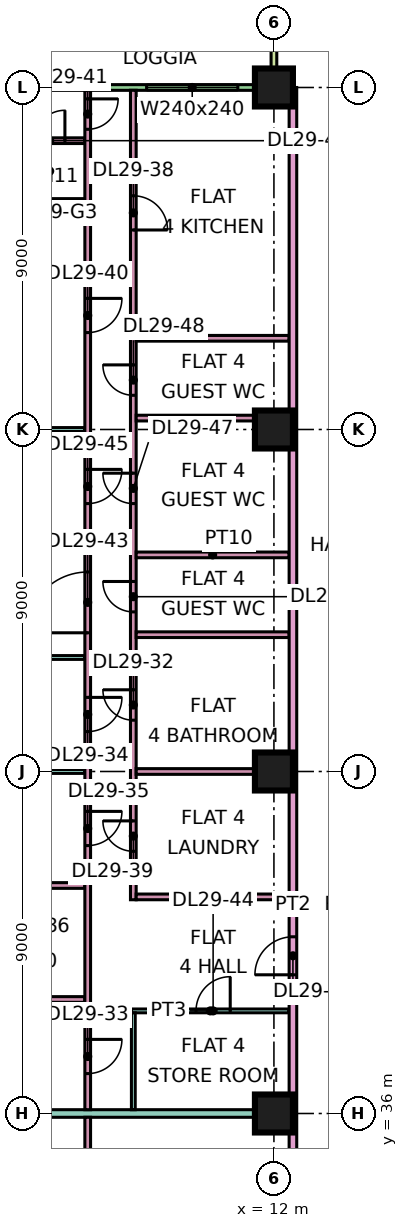
"""IFC4 building model, lengths in metres.
Left out: names, types, materials, properties, quantities, classifications, styles, units other than length and angle.
Written with IfcOpenShell. Run it as: python <this file> out.ifc"""

import sys

from ifc_helpers import new_model, si_unit, direction, frame, frame_2d, origin, origin_2d, place, context, subcontext, project, spatial, rectangle, extrude, element, fill, save


model = new_model("IFC4")
c1 = context("Model", 3, precision=1e-05, world=origin(), true_north=direction((0.0, 1.0)))
c2 = subcontext(c1, "Body", "Model", "MODEL_VIEW")
j1 = project(units=[si_unit("LENGTHUNIT", "METRE"), si_unit("PLANEANGLEUNIT", "RADIAN")], contexts=[c1])
p1 = place(None, origin())
s1 = spatial("IfcSite", under=j1, at=p1, CompositionType="ELEMENT")
p2 = place(p1, origin())
s2 = spatial("IfcBuilding", under=s1, at=p2, CompositionType="ELEMENT")
p3 = place(p2, frame((0.0, 0.0, 125.65)))
s3 = spatial("IfcBuildingStorey", under=s2, at=p3, CompositionType="ELEMENT", Elevation=125.65)
for number, where, z_axis, x_axis in (
    (1, (12.0, 36.0, 0.0), (0.0, 0.0, 1.0), (1.0, 0.0, 0.0)),
    (2, (12.0, 45.0, 0.0), (0.0, 0.0, 1.0), (1.0, 0.0, 0.0)),
    (3, (12.0, 54.0, 0.0), (0.0, 0.0, 1.0), (1.0, 0.0, 0.0)),
    (4, (12.0, 63.0, 0.0), (0.0, 0.0, 1.0), (1.0, 0.0, 0.0)),
):
    element("IfcColumn", number, at=place(p3, frame(where, z_axis=z_axis, x_axis=x_axis)), inside=s3, PredefinedType="COLUMN", context=c2, shape_type="SweptSolid", body=[
        extrude(rectangle(XDim=1.0, YDim=1.0, at=origin_2d()), origin(), (0.0, 0.0, 1.0), 3.75),
    ])
p4 = place(p3, frame((11.925, 63.0, 0.0), z_axis=(0.0, 0.0, 1.0), x_axis=(-1.0, 0.0, 0.0)))
e5 = element("IfcWall", 5, at=p4, inside=s3, PredefinedType="SOLIDWALL", context=c2, shape_type="SweptSolid", body=[
    extrude(rectangle(XDim=10.35, YDim=0.15, at=frame_2d((5.175, 0.0))), origin(), (0.0, 0.0, 1.0), 3.35),
])
p5 = place(p4, frame((0.875, 0.0, 0.45)))
e6 = element("IfcOpeningElement", 6, at=p5, cuts=e5, PredefinedType="OPENING", context=c2, shape_type="SweptSolid", body=[
    extrude(rectangle(XDim=2.4, YDim=2.4, at=frame_2d((1.2, 1.2))), frame((0.0, 0.085, 0.0), z_axis=(0.0, -1.0, 0.0), x_axis=(1.0, 0.0, 0.0)), (0.0, 0.0, 1.0), 0.17),
])
p6 = place(p4, frame((6.688, 0.0, 0.0)))
e7 = element("IfcOpeningElement", 7, at=p6, cuts=e5, PredefinedType="OPENING", context=c2, shape_type="SweptSolid", body=[
    extrude(rectangle(XDim=1.8, YDim=2.4, at=frame_2d((0.9, 1.2))), frame((0.0, 0.085, 0.0), z_axis=(0.0, -1.0, 0.0), x_axis=(1.0, 0.0, 0.0)), (0.0, 0.0, 1.0), 0.17),
])
p7 = place(p3, frame((12.0, 64.5, 0.0), z_axis=(0.0, 0.0, 1.0), x_axis=(0.0, -1.0, 0.0)))
e8 = element("IfcWall", 8, at=p7, inside=s3, PredefinedType="SOLIDWALL", context=c2, shape_type="SweptSolid", body=[
    extrude(rectangle(XDim=1.5, YDim=0.15, at=frame_2d((0.75, 0.0))), origin(), (0.0, 0.0, 1.0), 3.35),
])
p8 = place(p3, frame((-1.351, 39.0, 0.0), z_axis=(0.0, 0.0, 1.0), x_axis=(1.0, 0.0, 0.0)))
e9 = element("IfcWall", 9, at=p8, inside=s3, PredefinedType="PARTITIONING", context=c2, shape_type="SweptSolid", body=[
    extrude(rectangle(XDim=8.376, YDim=0.15, at=frame_2d((4.188, 0.0))), origin(), (0.0, 0.0, 1.0), 3.35),
])
p9 = place(p3, frame((-1.351, 45.0, 0.0), z_axis=(0.0, 0.0, 1.0), x_axis=(1.0, 0.0, 0.0)))
e10 = element("IfcWall", 10, at=p9, inside=s3, PredefinedType="PARTITIONING", context=c2, shape_type="SweptSolid", body=[
    extrude(rectangle(XDim=8.376, YDim=0.1, at=frame_2d((4.188, 0.0))), origin(), (0.0, 0.0, 1.0), 3.35),
])
p10 = place(p3, frame((0.0, 36.0, 0.0), z_axis=(0.0, 0.0, 1.0), x_axis=(1.0, 0.0, 0.0)))
e11 = element("IfcWall", 11, at=p10, inside=s3, PredefinedType="PARTITIONING", context=c2, shape_type="SweptSolid", body=[
    extrude(rectangle(XDim=12.4, YDim=0.2, at=frame_2d((6.2, 0.0))), origin(), (0.0, 0.0, 1.0), 3.35),
])
p11 = place(p3, frame((0.0, 48.0, 0.0), z_axis=(0.0, 0.0, 1.0), x_axis=(1.0, 0.0, 0.0)))
e12 = element("IfcWall", 12, at=p11, inside=s3, PredefinedType="PARTITIONING", context=c2, shape_type="SweptSolid", body=[
    extrude(rectangle(XDim=7.025, YDim=0.1, at=frame_2d((3.512, 0.0))), origin(), (0.0, 0.0, 1.0), 3.35),
])
for number, where, z_axis, x_axis in (
    (13, (0.074, 51.0, 0.0), (0.0, 0.0, 1.0), (1.0, 0.0, 0.0)),
    (14, (0.074, 54.0, 0.0), (0.0, 0.0, 1.0), (1.0, 0.0, 0.0)),
):
    element("IfcWall", number, at=place(p3, frame(where, z_axis=z_axis, x_axis=x_axis)), inside=s3, PredefinedType="PARTITIONING", context=c2, shape_type="SweptSolid", body=[
        extrude(rectangle(XDim=6.951, YDim=0.1, at=frame_2d((3.476, 0.0))), origin(), (0.0, 0.0, 1.0), 3.35),
    ])
p12 = place(p3, frame((0.074, 60.0, 0.0), z_axis=(0.0, 0.0, 1.0), x_axis=(1.0, 0.0, 0.0)))
e15 = element("IfcWall", 15, at=p12, inside=s3, PredefinedType="PARTITIONING", context=c2, shape_type="SweptSolid", body=[
    extrude(rectangle(XDim=6.951, YDim=0.15, at=frame_2d((3.476, 0.0))), origin(), (0.0, 0.0, 1.0), 3.35),
])
p13 = place(p3, frame((4.175, 42.0, 0.0), z_axis=(0.0, 0.0, 1.0), x_axis=(1.0, 0.0, 0.0)))
e16 = element("IfcWall", 16, at=p13, inside=s3, PredefinedType="PARTITIONING", context=c2, shape_type="SweptSolid", body=[
    extrude(rectangle(XDim=2.85, YDim=0.15, at=frame_2d((1.425, 0.0))), origin(), (0.0, 0.0, 1.0), 3.35),
])
p14 = place(p13, frame((0.975, 0.0, 0.0)))
e17 = element("IfcOpeningElement", 17, at=p14, cuts=e16, PredefinedType="OPENING", context=c2, shape_type="SweptSolid", body=[
    extrude(rectangle(XDim=0.8, YDim=2.1, at=frame_2d((0.4, 1.05))), frame((0.0, 0.085, 0.0), z_axis=(0.0, -1.0, 0.0), x_axis=(1.0, 0.0, 0.0)), (0.0, 0.0, 1.0), 0.17),
])
p15 = place(p3, frame((5.025, 61.6, 0.0), z_axis=(0.0, 0.0, 1.0), x_axis=(1.0, 0.0, 0.0)))
e18 = element("IfcWall", 18, at=p15, inside=s3, PredefinedType="PARTITIONING", context=c2, shape_type="SweptSolid", body=[
    extrude(rectangle(XDim=2.0, YDim=0.15, at=frame_2d((1.0, 0.0))), origin(), (0.0, 0.0, 1.0), 3.35),
])
p16 = place(p15, frame((0.675, 0.0, 0.0)))
e19 = element("IfcOpeningElement", 19, at=p16, cuts=e18, PredefinedType="OPENING", context=c2, shape_type="SweptSolid", body=[
    extrude(rectangle(XDim=0.8, YDim=2.1, at=frame_2d((0.4, 1.05))), frame((0.0, 0.085, 0.0), z_axis=(0.0, -1.0, 0.0), x_axis=(1.0, 0.0, 0.0)), (0.0, 0.0, 1.0), 0.17),
])
p17 = place(p3, frame((7.1, 27.525, 0.0), z_axis=(0.0, 0.0, 1.0), x_axis=(0.0, 1.0, 0.0)))
e20 = element("IfcWall", 20, at=p17, inside=s3, PredefinedType="PARTITIONING", context=c2, shape_type="SweptSolid", body=[
    extrude(rectangle(XDim=8.375, YDim=0.15, at=frame_2d((4.188, 0.0))), origin(), (0.0, 0.0, 1.0), 3.35),
])
p18 = place(p17, frame((0.675, 0.0, 0.0)))
e21 = element("IfcOpeningElement", 21, at=p18, cuts=e20, PredefinedType="OPENING", context=c2, shape_type="SweptSolid", body=[
    extrude(rectangle(XDim=0.8, YDim=2.1, at=frame_2d((0.4, 1.05))), frame((0.0, 0.085, 0.0), z_axis=(0.0, -1.0, 0.0), x_axis=(1.0, 0.0, 0.0)), (0.0, 0.0, 1.0), 0.17),
])
p19 = place(p17, frame((4.875, 0.0, 0.0)))
e22 = element("IfcOpeningElement", 22, at=p19, cuts=e20, PredefinedType="OPENING", context=c2, shape_type="SweptSolid", body=[
    extrude(rectangle(XDim=0.9, YDim=2.1, at=frame_2d((0.45, 1.05))), frame((0.0, 0.085, 0.0), z_axis=(0.0, -1.0, 0.0), x_axis=(1.0, 0.0, 0.0)), (0.0, 0.0, 1.0), 0.17),
])
p20 = place(p3, frame((7.1, 36.1, 0.0), z_axis=(0.0, 0.0, 1.0), x_axis=(0.0, 1.0, 0.0)))
e23 = element("IfcWall", 23, at=p20, inside=s3, PredefinedType="PARTITIONING", context=c2, shape_type="SweptSolid", body=[
    extrude(rectangle(XDim=26.826, YDim=0.15, at=frame_2d((13.413, 0.0))), origin(), (0.0, 0.0, 1.0), 3.35),
])
p21 = place(p20, frame((0.95, 0.0, 0.0)))
e24 = element("IfcOpeningElement", 24, at=p21, cuts=e23, PredefinedType="OPENING", context=c2, shape_type="SweptSolid", body=[
    extrude(rectangle(XDim=0.9, YDim=2.1, at=frame_2d((0.45, 1.05))), frame((0.0, 0.085, 0.0), z_axis=(0.0, -1.0, 0.0), x_axis=(1.0, 0.0, 0.0)), (0.0, 0.0, 1.0), 0.17),
])
p22 = place(p20, frame((9.95, 0.0, 0.0)))
e25 = element("IfcOpeningElement", 25, at=p22, cuts=e23, PredefinedType="OPENING", context=c2, shape_type="SweptSolid", body=[
    extrude(rectangle(XDim=0.9, YDim=2.1, at=frame_2d((0.45, 1.05))), frame((0.0, 0.085, 0.0), z_axis=(0.0, -1.0, 0.0), x_axis=(1.0, 0.0, 0.0)), (0.0, 0.0, 1.0), 0.17),
])
p23 = place(p20, frame((6.95, 0.0, 0.0)))
e26 = element("IfcOpeningElement", 26, at=p23, cuts=e23, PredefinedType="OPENING", context=c2, shape_type="SweptSolid", body=[
    extrude(rectangle(XDim=0.9, YDim=2.1, at=frame_2d((0.45, 1.05))), frame((0.0, 0.085, 0.0), z_axis=(0.0, -1.0, 0.0), x_axis=(1.0, 0.0, 0.0)), (0.0, 0.0, 1.0), 0.17),
])
p24 = place(p20, frame((20.45, 0.0, 0.0)))
e27 = element("IfcOpeningElement", 27, at=p24, cuts=e23, PredefinedType="OPENING", context=c2, shape_type="SweptSolid", body=[
    extrude(rectangle(XDim=0.9, YDim=2.1, at=frame_2d((0.45, 1.05))), frame((0.0, 0.085, 0.0), z_axis=(0.0, -1.0, 0.0), x_axis=(1.0, 0.0, 0.0)), (0.0, 0.0, 1.0), 0.17),
])
p25 = place(p20, frame((25.8, 0.0, 0.0)))
e28 = element("IfcOpeningElement", 28, at=p25, cuts=e23, PredefinedType="OPENING", context=c2, shape_type="SweptSolid", body=[
    extrude(rectangle(XDim=0.8, YDim=2.1, at=frame_2d((0.4, 1.05))), frame((0.0, 0.085, 0.0), z_axis=(0.0, -1.0, 0.0), x_axis=(1.0, 0.0, 0.0)), (0.0, 0.0, 1.0), 0.17),
])
p26 = place(p20, frame((12.55, 0.0, 0.0)))
e29 = element("IfcOpeningElement", 29, at=p26, cuts=e23, PredefinedType="OPENING", context=c2, shape_type="SweptSolid", body=[
    extrude(rectangle(XDim=1.6, YDim=2.1, at=frame_2d((0.8, 1.05))), frame((0.0, 0.085, 0.0), z_axis=(0.0, -1.0, 0.0), x_axis=(1.0, 0.0, 0.0)), (0.0, 0.0, 1.0), 0.17),
])
p27 = place(p20, frame((15.95, 0.0, 0.0)))
e30 = element("IfcOpeningElement", 30, at=p27, cuts=e23, PredefinedType="OPENING", context=c2, shape_type="SweptSolid", body=[
    extrude(rectangle(XDim=0.9, YDim=2.1, at=frame_2d((0.45, 1.05))), frame((0.0, 0.085, 0.0), z_axis=(0.0, -1.0, 0.0), x_axis=(1.0, 0.0, 0.0)), (0.0, 0.0, 1.0), 0.17),
])
p28 = place(p3, frame((8.25, 38.7, 0.0), z_axis=(0.0, 0.0, 1.0), x_axis=(1.0, 0.0, 0.0)))
e31 = element("IfcWall", 31, at=p28, inside=s3, PredefinedType="PARTITIONING", context=c2, shape_type="SweptSolid", body=[
    extrude(rectangle(XDim=4.15, YDim=0.1, at=frame_2d((2.075, 0.0))), origin(), (0.0, 0.0, 1.0), 3.35),
])
p29 = place(p28, frame((1.7, 0.0, 0.0)))
e32 = element("IfcOpeningElement", 32, at=p29, cuts=e31, PredefinedType="OPENING", context=c2, shape_type="SweptSolid", body=[
    extrude(rectangle(XDim=0.9, YDim=2.1, at=frame_2d((0.45, 1.05))), frame((0.0, 0.06, 0.0), z_axis=(0.0, -1.0, 0.0), x_axis=(1.0, 0.0, 0.0)), (0.0, 0.0, 1.0), 0.12),
])
p30 = place(p3, frame((8.3, 36.1, 0.0), z_axis=(0.0, 0.0, 1.0), x_axis=(0.0, 1.0, 0.0)))
e33 = element("IfcWall", 33, at=p30, inside=s3, PredefinedType="PARTITIONING", context=c2, shape_type="SweptSolid", body=[
    extrude(rectangle(XDim=2.55, YDim=0.1, at=frame_2d((1.275, 0.0))), origin(), (0.0, 0.0, 1.0), 3.35),
])
p31 = place(p3, frame((8.3, 41.625, 0.0), z_axis=(0.0, 0.0, 1.0), x_axis=(0.0, 1.0, 0.0)))
e34 = element("IfcWall", 34, at=p31, inside=s3, PredefinedType="PARTITIONING", context=c2, shape_type="SweptSolid", body=[
    extrude(rectangle(XDim=21.301, YDim=0.15, at=frame_2d((10.65, 0.0))), origin(), (0.0, 0.0, 1.0), 3.35),
])
p32 = place(p31, frame((4.725, 0.0, 0.0)))
e35 = element("IfcOpeningElement", 35, at=p32, cuts=e34, PredefinedType="OPENING", context=c2, shape_type="SweptSolid", body=[
    extrude(rectangle(XDim=0.8, YDim=2.1, at=frame_2d((0.4, 1.05))), frame((0.0, 0.085, 0.0), z_axis=(0.0, -1.0, 0.0), x_axis=(1.0, 0.0, 0.0)), (0.0, 0.0, 1.0), 0.17),
])
p33 = place(p31, frame((17.625, 0.0, 0.0)))
e36 = element("IfcOpeningElement", 36, at=p33, cuts=e34, PredefinedType="OPENING", context=c2, shape_type="SweptSolid", body=[
    extrude(rectangle(XDim=0.9, YDim=2.1, at=frame_2d((0.45, 1.05))), frame((0.0, 0.085, 0.0), z_axis=(0.0, -1.0, 0.0), x_axis=(1.0, 0.0, 0.0)), (0.0, 0.0, 1.0), 0.17),
])
p34 = place(p31, frame((1.275, 0.0, 0.0)))
e37 = element("IfcOpeningElement", 37, at=p34, cuts=e34, PredefinedType="OPENING", context=c2, shape_type="SweptSolid", body=[
    extrude(rectangle(XDim=0.8, YDim=2.1, at=frame_2d((0.4, 1.05))), frame((0.0, 0.085, 0.0), z_axis=(0.0, -1.0, 0.0), x_axis=(1.0, 0.0, 0.0)), (0.0, 0.0, 1.0), 0.17),
])
p35 = place(p31, frame((7.575, 0.0, 0.0)))
e38 = element("IfcOpeningElement", 38, at=p35, cuts=e34, PredefinedType="OPENING", context=c2, shape_type="SweptSolid", body=[
    extrude(rectangle(XDim=0.8, YDim=2.1, at=frame_2d((0.4, 1.05))), frame((0.0, 0.085, 0.0), z_axis=(0.0, -1.0, 0.0), x_axis=(1.0, 0.0, 0.0)), (0.0, 0.0, 1.0), 0.17),
])
p36 = place(p31, frame((10.425, 0.0, 0.0)))
e39 = element("IfcOpeningElement", 39, at=p36, cuts=e34, PredefinedType="OPENING", context=c2, shape_type="SweptSolid", body=[
    extrude(rectangle(XDim=0.8, YDim=2.1, at=frame_2d((0.4, 1.05))), frame((0.0, 0.085, 0.0), z_axis=(0.0, -1.0, 0.0), x_axis=(1.0, 0.0, 0.0)), (0.0, 0.0, 1.0), 0.17),
])
p37 = place(p31, frame((13.275, 0.0, 0.0)))
e40 = element("IfcOpeningElement", 40, at=p37, cuts=e34, PredefinedType="OPENING", context=c2, shape_type="SweptSolid", body=[
    extrude(rectangle(XDim=0.8, YDim=2.1, at=frame_2d((0.4, 1.05))), frame((0.0, 0.085, 0.0), z_axis=(0.0, -1.0, 0.0), x_axis=(1.0, 0.0, 0.0)), (0.0, 0.0, 1.0), 0.17),
])
for number, where, z_axis, x_axis in (
    (41, (8.375, 41.7, 0.0), (0.0, 0.0, 1.0), (1.0, 0.0, 0.0)),
    (42, (8.375, 45.0, 0.0), (0.0, 0.0, 1.0), (1.0, 0.0, 0.0)),
    (43, (8.375, 48.6, 0.0), (0.0, 0.0, 1.0), (1.0, 0.0, 0.0)),
    (44, (8.375, 50.7, 0.0), (0.0, 0.0, 1.0), (1.0, 0.0, 0.0)),
    (45, (8.375, 54.3, 0.0), (0.0, 0.0, 1.0), (1.0, 0.0, 0.0)),
    (46, (8.375, 56.4, 0.0), (0.0, 0.0, 1.0), (1.0, 0.0, 0.0)),
):
    element("IfcWall", number, at=place(p3, frame(where, z_axis=z_axis, x_axis=x_axis)), inside=s3, PredefinedType="PARTITIONING", context=c2, shape_type="SweptSolid", body=[
        extrude(rectangle(XDim=4.025, YDim=0.15, at=frame_2d((2.012, 0.0))), origin(), (0.0, 0.0, 1.0), 3.35),
    ])
p38 = place(p3, frame((12.5, 20.0, 0.0), z_axis=(0.0, 0.0, 1.0), x_axis=(0.0, 1.0, 0.0)))
e47 = element("IfcWall", 47, at=p38, inside=s3, PredefinedType="PARTITIONING", context=c2, shape_type="SweptSolid", body=[
    extrude(rectangle(XDim=43.0, YDim=0.2, at=frame_2d((21.5, 0.0))), origin(), (0.0, 0.0, 1.0), 3.35),
])
p39 = place(p38, frame((19.65, 0.0, 0.0)))
e48 = element("IfcOpeningElement", 48, at=p39, cuts=e47, PredefinedType="OPENING", context=c2, shape_type="SweptSolid", body=[
    extrude(rectangle(XDim=1.0, YDim=2.1, at=frame_2d((0.5, 1.05))), frame((0.0, 0.11, 0.0), z_axis=(0.0, -1.0, 0.0), x_axis=(1.0, 0.0, 0.0)), (0.0, 0.0, 1.0), 0.22),
])
p40 = place(p38, frame((0.6, 0.0, 0.0)))
e49 = element("IfcOpeningElement", 49, at=p40, cuts=e47, PredefinedType="OPENING", context=c2, shape_type="SweptSolid", body=[
    extrude(rectangle(XDim=1.2, YDim=2.1, at=frame_2d((0.6, 1.05))), frame((0.0, 0.11, 0.0), z_axis=(0.0, -1.0, 0.0), x_axis=(1.0, 0.0, 0.0)), (0.0, 0.0, 1.0), 0.22),
])
p41 = place(p38, frame((4.5, 0.0, 0.0)))
e50 = element("IfcOpeningElement", 50, at=p41, cuts=e47, PredefinedType="OPENING", context=c2, shape_type="SweptSolid", body=[
    extrude(rectangle(XDim=1.0, YDim=2.1, at=frame_2d((0.5, 1.05))), frame((0.0, 0.11, 0.0), z_axis=(0.0, -1.0, 0.0), x_axis=(1.0, 0.0, 0.0)), (0.0, 0.0, 1.0), 0.22),
])
p42 = place(p5, origin())
e51 = element("IfcWindow", 51, at=p42, inside=s3, PartitioningType="SINGLE_PANEL", PredefinedType="WINDOW", context=c2, shape_type="SweptSolid", body=[
    extrude(rectangle(XDim=2.4, YDim=2.4, at=frame_2d((1.2, 1.2))), frame((0.0, 0.03, 0.0), z_axis=(0.0, -1.0, 0.0), x_axis=(1.0, 0.0, 0.0)), (0.0, 0.0, 1.0), 0.06),
])
fill(e6, e51)
p43 = place(p32, frame((0.8, 0.0, 0.0), z_axis=(0.0, 0.0, 1.0), x_axis=(-1.0, 0.0, 0.0)))
e52 = element("IfcDoor", 52, at=p43, inside=s3, OperationType="SINGLE_SWING_RIGHT", PredefinedType="DOOR", context=c2, shape_type="SweptSolid", body=[
    extrude(rectangle(XDim=0.8, YDim=2.1, at=frame_2d((0.4, 1.05))), frame((0.0, 0.025, 0.0), z_axis=(0.0, -1.0, 0.0), x_axis=(1.0, 0.0, 0.0)), (0.0, 0.0, 1.0), 0.05),
])
fill(e35, e52)
p44 = place(p21, origin())
e53 = element("IfcDoor", 53, at=p44, inside=s3, OperationType="SINGLE_SWING_RIGHT", PredefinedType="DOOR", context=c2, shape_type="SweptSolid", body=[
    extrude(rectangle(XDim=0.9, YDim=2.1, at=frame_2d((0.45, 1.05))), frame((0.0, 0.025, 0.0), z_axis=(0.0, -1.0, 0.0), x_axis=(1.0, 0.0, 0.0)), (0.0, 0.0, 1.0), 0.05),
])
fill(e24, e53)
p45 = place(p22, origin())
e54 = element("IfcDoor", 54, at=p45, inside=s3, OperationType="SINGLE_SWING_RIGHT", PredefinedType="DOOR", context=c2, shape_type="SweptSolid", body=[
    extrude(rectangle(XDim=0.9, YDim=2.1, at=frame_2d((0.45, 1.05))), frame((0.0, 0.025, 0.0), z_axis=(0.0, -1.0, 0.0), x_axis=(1.0, 0.0, 0.0)), (0.0, 0.0, 1.0), 0.05),
])
fill(e25, e54)
p46 = place(p23, origin())
e55 = element("IfcDoor", 55, at=p46, inside=s3, OperationType="SINGLE_SWING_RIGHT", PredefinedType="DOOR", context=c2, shape_type="SweptSolid", body=[
    extrude(rectangle(XDim=0.9, YDim=2.1, at=frame_2d((0.45, 1.05))), frame((0.0, 0.025, 0.0), z_axis=(0.0, -1.0, 0.0), x_axis=(1.0, 0.0, 0.0)), (0.0, 0.0, 1.0), 0.05),
])
fill(e26, e55)
p47 = place(p39, origin())
e56 = element("IfcDoor", 56, at=p47, inside=s3, OperationType="SINGLE_SWING_LEFT", PredefinedType="DOOR", context=c2, shape_type="SweptSolid", body=[
    extrude(rectangle(XDim=1.0, YDim=2.1, at=frame_2d((0.5, 1.05))), frame((0.0, 0.025, 0.0), z_axis=(0.0, -1.0, 0.0), x_axis=(1.0, 0.0, 0.0)), (0.0, 0.0, 1.0), 0.05),
])
fill(e48, e56)
p48 = place(p33, frame((0.9, 0.0, 0.0), z_axis=(0.0, 0.0, 1.0), x_axis=(-1.0, 0.0, 0.0)))
e57 = element("IfcDoor", 57, at=p48, inside=s3, OperationType="SINGLE_SWING_LEFT", PredefinedType="DOOR", context=c2, shape_type="SweptSolid", body=[
    extrude(rectangle(XDim=0.9, YDim=2.1, at=frame_2d((0.45, 1.05))), frame((0.0, 0.025, 0.0), z_axis=(0.0, -1.0, 0.0), x_axis=(1.0, 0.0, 0.0)), (0.0, 0.0, 1.0), 0.05),
])
fill(e36, e57)
p49 = place(p34, frame((0.8, 0.0, 0.0), z_axis=(0.0, 0.0, 1.0), x_axis=(-1.0, 0.0, 0.0)))
e58 = element("IfcDoor", 58, at=p49, inside=s3, OperationType="SINGLE_SWING_RIGHT", PredefinedType="DOOR", context=c2, shape_type="SweptSolid", body=[
    extrude(rectangle(XDim=0.8, YDim=2.1, at=frame_2d((0.4, 1.05))), frame((0.0, 0.025, 0.0), z_axis=(0.0, -1.0, 0.0), x_axis=(1.0, 0.0, 0.0)), (0.0, 0.0, 1.0), 0.05),
])
fill(e37, e58)
p50 = place(p24, origin())
e59 = element("IfcDoor", 59, at=p50, inside=s3, OperationType="SINGLE_SWING_RIGHT", PredefinedType="DOOR", context=c2, shape_type="SweptSolid", body=[
    extrude(rectangle(XDim=0.9, YDim=2.1, at=frame_2d((0.45, 1.05))), frame((0.0, 0.025, 0.0), z_axis=(0.0, -1.0, 0.0), x_axis=(1.0, 0.0, 0.0)), (0.0, 0.0, 1.0), 0.05),
])
fill(e27, e59)
p51 = place(p25, origin())
e60 = element("IfcDoor", 60, at=p51, inside=s3, OperationType="SINGLE_SWING_RIGHT", PredefinedType="DOOR", context=c2, shape_type="SweptSolid", body=[
    extrude(rectangle(XDim=0.8, YDim=2.1, at=frame_2d((0.4, 1.05))), frame((0.0, 0.025, 0.0), z_axis=(0.0, -1.0, 0.0), x_axis=(1.0, 0.0, 0.0)), (0.0, 0.0, 1.0), 0.05),
])
fill(e28, e60)
p52 = place(p16, frame((0.8, 0.0, 0.0), z_axis=(0.0, 0.0, 1.0), x_axis=(-1.0, 0.0, 0.0)))
e61 = element("IfcDoor", 61, at=p52, inside=s3, OperationType="SINGLE_SWING_RIGHT", PredefinedType="DOOR", context=c2, shape_type="SweptSolid", body=[
    extrude(rectangle(XDim=0.8, YDim=2.1, at=frame_2d((0.4, 1.05))), frame((0.0, 0.025, 0.0), z_axis=(0.0, -1.0, 0.0), x_axis=(1.0, 0.0, 0.0)), (0.0, 0.0, 1.0), 0.05),
])
fill(e19, e61)
p53 = place(p26, origin())
e62 = element("IfcDoor", 62, at=p53, inside=s3, OperationType="DOUBLE_DOOR_SINGLE_SWING", PredefinedType="DOOR", context=c2, shape_type="SweptSolid", body=[
    extrude(rectangle(XDim=1.6, YDim=2.1, at=frame_2d((0.8, 1.05))), frame((0.0, 0.025, 0.0), z_axis=(0.0, -1.0, 0.0), x_axis=(1.0, 0.0, 0.0)), (0.0, 0.0, 1.0), 0.05),
])
fill(e29, e62)
p54 = place(p29, frame((0.9, 0.0, 0.0), z_axis=(0.0, 0.0, 1.0), x_axis=(-1.0, 0.0, 0.0)))
e63 = element("IfcDoor", 63, at=p54, inside=s3, OperationType="SINGLE_SWING_RIGHT", PredefinedType="DOOR", context=c2, shape_type="SweptSolid", body=[
    extrude(rectangle(XDim=0.9, YDim=2.1, at=frame_2d((0.45, 1.05))), frame((0.0, 0.025, 0.0), z_axis=(0.0, -1.0, 0.0), x_axis=(1.0, 0.0, 0.0)), (0.0, 0.0, 1.0), 0.05),
])
fill(e32, e63)
p55 = place(p27, origin())
e64 = element("IfcDoor", 64, at=p55, inside=s3, OperationType="SINGLE_SWING_RIGHT", PredefinedType="DOOR", context=c2, shape_type="SweptSolid", body=[
    extrude(rectangle(XDim=0.9, YDim=2.1, at=frame_2d((0.45, 1.05))), frame((0.0, 0.025, 0.0), z_axis=(0.0, -1.0, 0.0), x_axis=(1.0, 0.0, 0.0)), (0.0, 0.0, 1.0), 0.05),
])
fill(e30, e64)
p56 = place(p35, frame((0.8, 0.0, 0.0), z_axis=(0.0, 0.0, 1.0), x_axis=(-1.0, 0.0, 0.0)))
e65 = element("IfcDoor", 65, at=p56, inside=s3, OperationType="SINGLE_SWING_RIGHT", PredefinedType="DOOR", context=c2, shape_type="SweptSolid", body=[
    extrude(rectangle(XDim=0.8, YDim=2.1, at=frame_2d((0.4, 1.05))), frame((0.0, 0.025, 0.0), z_axis=(0.0, -1.0, 0.0), x_axis=(1.0, 0.0, 0.0)), (0.0, 0.0, 1.0), 0.05),
])
fill(e38, e65)
p57 = place(p36, frame((0.8, 0.0, 0.0), z_axis=(0.0, 0.0, 1.0), x_axis=(-1.0, 0.0, 0.0)))
e66 = element("IfcDoor", 66, at=p57, inside=s3, OperationType="SINGLE_SWING_RIGHT", PredefinedType="DOOR", context=c2, shape_type="SweptSolid", body=[
    extrude(rectangle(XDim=0.8, YDim=2.1, at=frame_2d((0.4, 1.05))), frame((0.0, 0.025, 0.0), z_axis=(0.0, -1.0, 0.0), x_axis=(1.0, 0.0, 0.0)), (0.0, 0.0, 1.0), 0.05),
])
fill(e39, e66)
p58 = place(p37, frame((0.8, 0.0, 0.0), z_axis=(0.0, 0.0, 1.0), x_axis=(-1.0, 0.0, 0.0)))
e67 = element("IfcDoor", 67, at=p58, inside=s3, OperationType="SINGLE_SWING_RIGHT", PredefinedType="DOOR", context=c2, shape_type="SweptSolid", body=[
    extrude(rectangle(XDim=0.8, YDim=2.1, at=frame_2d((0.4, 1.05))), frame((0.0, 0.025, 0.0), z_axis=(0.0, -1.0, 0.0), x_axis=(1.0, 0.0, 0.0)), (0.0, 0.0, 1.0), 0.05),
])
fill(e40, e67)
save(model, sys.argv[1])
